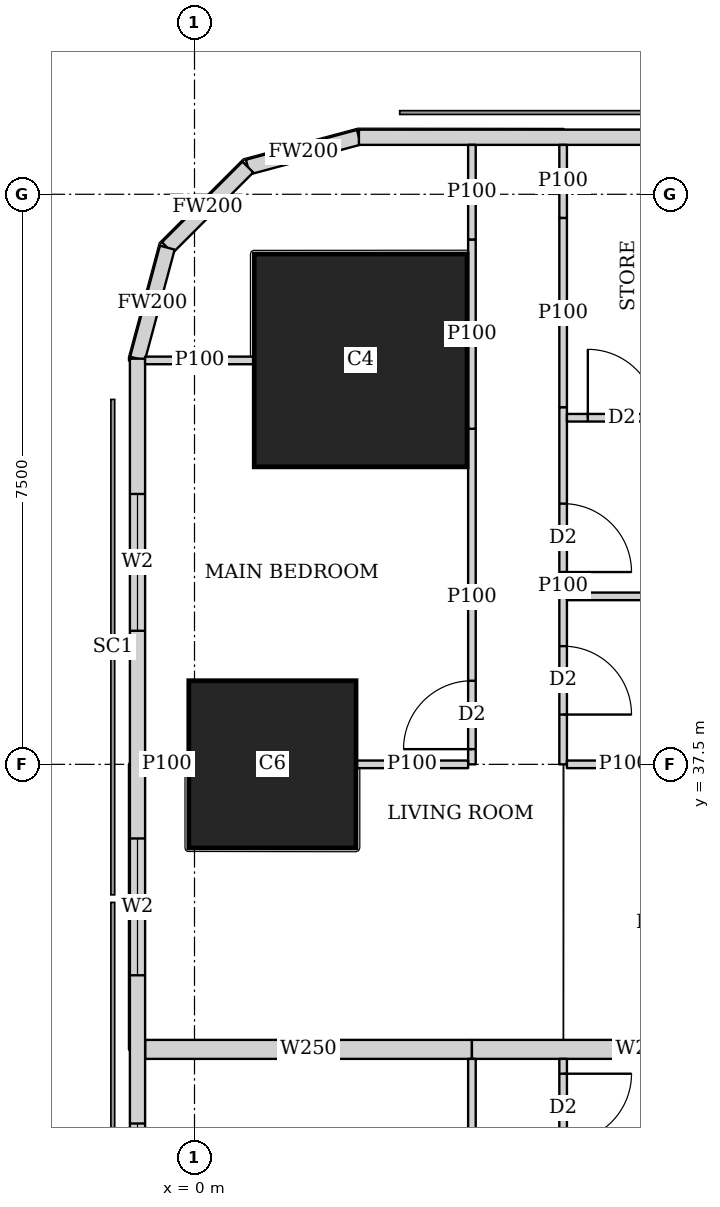
"""IFC4 building model, lengths in metres.
Left out: names, types, materials, properties, quantities, classifications, styles, units other than length and angle.
Written with IfcOpenShell. Run it as: python <this file> out.ifc"""

import sys

from ifc_helpers import new_model, si_unit, direction, frame, frame_2d, origin, origin_2d, place, context, subcontext, project, spatial, rectangle, extrude, element, fill, save


model = new_model("IFC4")
c1 = context("Model", 3, precision=1e-05, world=origin(), true_north=direction((0.0, 1.0)))
c2 = subcontext(c1, "Body", "Model", "MODEL_VIEW")
j1 = project(units=[si_unit("LENGTHUNIT", "METRE"), si_unit("PLANEANGLEUNIT", "RADIAN")], contexts=[c1])
p1 = place(None, origin())
s1 = spatial("IfcSite", under=j1, at=p1, CompositionType="ELEMENT")
p2 = place(p1, origin())
s2 = spatial("IfcBuilding", under=s1, at=p2, CompositionType="ELEMENT")
p3 = place(p2, frame((0.0, 0.0, 100.4)))
s3 = spatial("IfcBuildingStorey", under=s2, at=p3, CompositionType="ELEMENT", Elevation=100.4)
p4 = place(p3, frame((1.025, 37.5, 0.0), z_axis=(0.0, 0.0, 1.0), x_axis=(1.0, 0.0, 0.0)))
e1 = element("IfcColumn", 1, at=p4, inside=s3, PredefinedType="COLUMN", context=c2, shape_type="SweptSolid", body=[
    extrude(rectangle(XDim=2.2, YDim=2.2, at=origin_2d()), origin(), (0.0, 0.0, 1.0), 3.75),
])
p5 = place(p3, frame((2.186, 42.814, 0.0), z_axis=(0.0, 0.0, 1.0), x_axis=(1.0, 0.0, 0.0)))
e2 = element("IfcColumn", 2, at=p5, inside=s3, PredefinedType="COLUMN", context=c2, shape_type="SweptSolid", body=[
    extrude(rectangle(XDim=2.8, YDim=2.8, at=origin_2d()), origin(), (0.0, 0.0, 1.0), 3.75),
])
p6 = place(p3, frame((40.106, 45.75, 0.0), z_axis=(0.0, 0.0, 1.0), x_axis=(-1.0, 0.0, 0.0)))
e3 = element("IfcWall", 3, at=p6, inside=s3, PredefinedType="SOLIDWALL", context=c2, shape_type="SweptSolid", body=[
    extrude(rectangle(XDim=37.943, YDim=0.2, at=frame_2d((18.971, 0.0))), origin(), (0.0, 0.0, 1.0), 3.5),
])
p7 = place(p6, frame((8.606, 0.0, 0.9)))
e4 = element("IfcOpeningElement", 4, at=p7, cuts=e3, PredefinedType="OPENING", context=c2, shape_type="SweptSolid", body=[
    extrude(rectangle(XDim=1.8, YDim=1.5, at=frame_2d((0.9, 0.75))), frame((0.0, 0.11, 0.0), z_axis=(0.0, -1.0, 0.0), x_axis=(1.0, 0.0, 0.0)), (0.0, 0.0, 1.0), 0.22),
])
p8 = place(p6, frame((12.206, 0.0, 0.9)))
e5 = element("IfcOpeningElement", 5, at=p8, cuts=e3, PredefinedType="OPENING", context=c2, shape_type="SweptSolid", body=[
    extrude(rectangle(XDim=1.8, YDim=1.5, at=frame_2d((0.9, 0.75))), frame((0.0, 0.11, 0.0), z_axis=(0.0, -1.0, 0.0), x_axis=(1.0, 0.0, 0.0)), (0.0, 0.0, 1.0), 0.22),
])
p9 = place(p6, frame((15.806, 0.0, 0.9)))
e6 = element("IfcOpeningElement", 6, at=p9, cuts=e3, PredefinedType="OPENING", context=c2, shape_type="SweptSolid", body=[
    extrude(rectangle(XDim=1.8, YDim=1.5, at=frame_2d((0.9, 0.75))), frame((0.0, 0.11, 0.0), z_axis=(0.0, -1.0, 0.0), x_axis=(1.0, 0.0, 0.0)), (0.0, 0.0, 1.0), 0.22),
])
p10 = place(p6, frame((19.406, 0.0, 0.9)))
e7 = element("IfcOpeningElement", 7, at=p10, cuts=e3, PredefinedType="OPENING", context=c2, shape_type="SweptSolid", body=[
    extrude(rectangle(XDim=1.8, YDim=1.5, at=frame_2d((0.9, 0.75))), frame((0.0, 0.11, 0.0), z_axis=(0.0, -1.0, 0.0), x_axis=(1.0, 0.0, 0.0)), (0.0, 0.0, 1.0), 0.22),
])
p11 = place(p6, frame((23.006, 0.0, 0.9)))
e8 = element("IfcOpeningElement", 8, at=p11, cuts=e3, PredefinedType="OPENING", context=c2, shape_type="SweptSolid", body=[
    extrude(rectangle(XDim=1.8, YDim=1.5, at=frame_2d((0.9, 0.75))), frame((0.0, 0.11, 0.0), z_axis=(0.0, -1.0, 0.0), x_axis=(1.0, 0.0, 0.0)), (0.0, 0.0, 1.0), 0.22),
])
p12 = place(p6, frame((26.606, 0.0, 0.9)))
e9 = element("IfcOpeningElement", 9, at=p12, cuts=e3, PredefinedType="OPENING", context=c2, shape_type="SweptSolid", body=[
    extrude(rectangle(XDim=1.8, YDim=1.5, at=frame_2d((0.9, 0.75))), frame((0.0, 0.11, 0.0), z_axis=(0.0, -1.0, 0.0), x_axis=(1.0, 0.0, 0.0)), (0.0, 0.0, 1.0), 0.22),
])
p13 = place(p3, frame((2.163, 45.75, 0.0), z_axis=(0.0, 0.0, 1.0), x_axis=(-0.965832000415, -0.259168954497, 0.0)))
e10 = element("IfcWall", 10, at=p13, inside=s3, PredefinedType="SOLIDWALL", context=c2, shape_type="SweptSolid", body=[
    extrude(rectangle(XDim=1.513, YDim=0.2, at=frame_2d((0.756, 0.0))), origin(), (0.0, 0.0, 1.0), 3.5),
])
p14 = place(p3, frame((0.702, 45.358, 0.0), z_axis=(0.0, 0.0, 1.0), x_axis=(-0.707106781187, -0.707106781187, 0.0)))
e11 = element("IfcWall", 11, at=p14, inside=s3, PredefinedType="SOLIDWALL", context=c2, shape_type="SweptSolid", body=[
    extrude(rectangle(XDim=1.499, YDim=0.2, at=frame_2d((0.75, 0.0))), origin(), (0.0, 0.0, 1.0), 3.5),
])
p15 = place(p3, frame((-0.358, 44.298, 0.0), z_axis=(0.0, 0.0, 1.0), x_axis=(-0.259168954497, -0.965832000415, 0.0)))
e12 = element("IfcWall", 12, at=p15, inside=s3, PredefinedType="SOLIDWALL", context=c2, shape_type="SweptSolid", body=[
    extrude(rectangle(XDim=1.513, YDim=0.2, at=frame_2d((0.756, 0.0))), origin(), (0.0, 0.0, 1.0), 3.5),
])
p16 = place(p3, frame((-0.75, 42.837, 0.0), z_axis=(0.0, 0.0, 1.0), x_axis=(0.0, -1.0, 0.0)))
e13 = element("IfcWall", 13, at=p16, inside=s3, PredefinedType="SOLIDWALL", context=c2, shape_type="SweptSolid", body=[
    extrude(rectangle(XDim=40.674, YDim=0.2, at=frame_2d((20.337, 0.0))), origin(), (0.0, 0.0, 1.0), 3.5),
])
p17 = place(p16, frame((1.78, 0.0, 0.9)))
e14 = element("IfcOpeningElement", 14, at=p17, cuts=e13, PredefinedType="OPENING", context=c2, shape_type="SweptSolid", body=[
    extrude(rectangle(XDim=1.8, YDim=1.5, at=frame_2d((0.9, 0.75))), frame((0.0, 0.11, 0.0), z_axis=(0.0, -1.0, 0.0), x_axis=(1.0, 0.0, 0.0)), (0.0, 0.0, 1.0), 0.22),
])
p18 = place(p16, frame((6.312, 0.0, 0.9)))
e15 = element("IfcOpeningElement", 15, at=p18, cuts=e13, PredefinedType="OPENING", context=c2, shape_type="SweptSolid", body=[
    extrude(rectangle(XDim=1.8, YDim=1.5, at=frame_2d((0.9, 0.75))), frame((0.0, 0.11, 0.0), z_axis=(0.0, -1.0, 0.0), x_axis=(1.0, 0.0, 0.0)), (0.0, 0.0, 1.0), 0.22),
])
p19 = place(p16, frame((10.062, 0.0, 0.9)))
e16 = element("IfcOpeningElement", 16, at=p19, cuts=e13, PredefinedType="OPENING", context=c2, shape_type="SweptSolid", body=[
    extrude(rectangle(XDim=1.8, YDim=1.5, at=frame_2d((0.9, 0.75))), frame((0.0, 0.11, 0.0), z_axis=(0.0, -1.0, 0.0), x_axis=(1.0, 0.0, 0.0)), (0.0, 0.0, 1.0), 0.22),
])
p20 = place(p16, frame((13.812, 0.0, 0.9)))
e17 = element("IfcOpeningElement", 17, at=p20, cuts=e13, PredefinedType="OPENING", context=c2, shape_type="SweptSolid", body=[
    extrude(rectangle(XDim=1.8, YDim=1.5, at=frame_2d((0.9, 0.75))), frame((0.0, 0.11, 0.0), z_axis=(0.0, -1.0, 0.0), x_axis=(1.0, 0.0, 0.0)), (0.0, 0.0, 1.0), 0.22),
])
p21 = place(p16, frame((17.562, 0.0, 0.9)))
e18 = element("IfcOpeningElement", 18, at=p21, cuts=e13, PredefinedType="OPENING", context=c2, shape_type="SweptSolid", body=[
    extrude(rectangle(XDim=1.8, YDim=1.5, at=frame_2d((0.9, 0.75))), frame((0.0, 0.11, 0.0), z_axis=(0.0, -1.0, 0.0), x_axis=(1.0, 0.0, 0.0)), (0.0, 0.0, 1.0), 0.22),
])
p22 = place(p16, frame((21.312, 0.0, 0.9)))
e19 = element("IfcOpeningElement", 19, at=p22, cuts=e13, PredefinedType="OPENING", context=c2, shape_type="SweptSolid", body=[
    extrude(rectangle(XDim=1.8, YDim=1.5, at=frame_2d((0.9, 0.75))), frame((0.0, 0.11, 0.0), z_axis=(0.0, -1.0, 0.0), x_axis=(1.0, 0.0, 0.0)), (0.0, 0.0, 1.0), 0.22),
])
p23 = place(p16, frame((25.062, 0.0, 0.9)))
e20 = element("IfcOpeningElement", 20, at=p23, cuts=e13, PredefinedType="OPENING", context=c2, shape_type="SweptSolid", body=[
    extrude(rectangle(XDim=1.8, YDim=1.5, at=frame_2d((0.9, 0.75))), frame((0.0, 0.11, 0.0), z_axis=(0.0, -1.0, 0.0), x_axis=(1.0, 0.0, 0.0)), (0.0, 0.0, 1.0), 0.22),
])
p24 = place(p16, frame((28.812, 0.0, 0.9)))
e21 = element("IfcOpeningElement", 21, at=p24, cuts=e13, PredefinedType="OPENING", context=c2, shape_type="SweptSolid", body=[
    extrude(rectangle(XDim=1.8, YDim=1.5, at=frame_2d((0.9, 0.75))), frame((0.0, 0.11, 0.0), z_axis=(0.0, -1.0, 0.0), x_axis=(1.0, 0.0, 0.0)), (0.0, 0.0, 1.0), 0.22),
])
p25 = place(p16, frame((32.562, 0.0, 0.9)))
e22 = element("IfcOpeningElement", 22, at=p25, cuts=e13, PredefinedType="OPENING", context=c2, shape_type="SweptSolid", body=[
    extrude(rectangle(XDim=1.8, YDim=1.5, at=frame_2d((0.9, 0.75))), frame((0.0, 0.11, 0.0), z_axis=(0.0, -1.0, 0.0), x_axis=(1.0, 0.0, 0.0)), (0.0, 0.0, 1.0), 0.22),
])
p26 = place(p16, frame((37.094, 0.0, 0.9)))
e23 = element("IfcOpeningElement", 23, at=p26, cuts=e13, PredefinedType="OPENING", context=c2, shape_type="SweptSolid", body=[
    extrude(rectangle(XDim=1.8, YDim=1.5, at=frame_2d((0.9, 0.75))), frame((0.0, 0.11, 0.0), z_axis=(0.0, -1.0, 0.0), x_axis=(1.0, 0.0, 0.0)), (0.0, 0.0, 1.0), 0.22),
])
p27 = place(p3, frame((3.65, 30.0, 0.0), z_axis=(0.0, 0.0, 1.0), x_axis=(0.0, 1.0, 0.0)))
e24 = element("IfcWall", 24, at=p27, inside=s3, PredefinedType="PARTITIONING", context=c2, shape_type="SweptSolid", body=[
    extrude(rectangle(XDim=3.625, YDim=0.1, at=frame_2d((1.812, 0.0))), origin(), (0.0, 0.0, 1.0), 3.5),
])
p28 = place(p27, frame((0.2, 0.0, 0.0)))
e25 = element("IfcOpeningElement", 25, at=p28, cuts=e24, PredefinedType="OPENING", context=c2, shape_type="SweptSolid", body=[
    extrude(rectangle(XDim=0.9, YDim=2.1, at=frame_2d((0.45, 1.05))), frame((0.0, 0.06, 0.0), z_axis=(0.0, -1.0, 0.0), x_axis=(1.0, 0.0, 0.0)), (0.0, 0.0, 1.0), 0.12),
])
p29 = place(p3, frame((4.85, 30.0, 0.0), z_axis=(0.0, 0.0, 1.0), x_axis=(0.0, 1.0, 0.0)))
e26 = element("IfcWall", 26, at=p29, inside=s3, PredefinedType="PARTITIONING", context=c2, shape_type="SweptSolid", body=[
    extrude(rectangle(XDim=3.625, YDim=0.1, at=frame_2d((1.812, 0.0))), origin(), (0.0, 0.0, 1.0), 3.5),
])
p30 = place(p29, frame((0.655, 0.0, 0.0)))
e27 = element("IfcOpeningElement", 27, at=p30, cuts=e26, PredefinedType="OPENING", context=c2, shape_type="SweptSolid", body=[
    extrude(rectangle(XDim=0.9, YDim=2.1, at=frame_2d((0.45, 1.05))), frame((0.0, 0.06, 0.0), z_axis=(0.0, -1.0, 0.0), x_axis=(1.0, 0.0, 0.0)), (0.0, 0.0, 1.0), 0.12),
])
p31 = place(p29, frame((2.53, 0.0, 0.0)))
e28 = element("IfcOpeningElement", 28, at=p31, cuts=e26, PredefinedType="OPENING", context=c2, shape_type="SweptSolid", body=[
    extrude(rectangle(XDim=0.9, YDim=2.1, at=frame_2d((0.45, 1.05))), frame((0.0, 0.06, 0.0), z_axis=(0.0, -1.0, 0.0), x_axis=(1.0, 0.0, 0.0)), (0.0, 0.0, 1.0), 0.12),
])
p32 = place(p3, frame((3.65, 37.5, 0.0), z_axis=(0.0, 0.0, 1.0), x_axis=(0.0, 1.0, 0.0)))
e29 = element("IfcWall", 29, at=p32, inside=s3, PredefinedType="PARTITIONING", context=c2, shape_type="SweptSolid", body=[
    extrude(rectangle(XDim=4.415, YDim=0.1, at=frame_2d((2.208, 0.0))), origin(), (0.0, 0.0, 1.0), 3.5),
])
p33 = place(p32, frame((0.2, 0.0, 0.0)))
e30 = element("IfcOpeningElement", 30, at=p33, cuts=e29, PredefinedType="OPENING", context=c2, shape_type="SweptSolid", body=[
    extrude(rectangle(XDim=0.9, YDim=2.1, at=frame_2d((0.45, 1.05))), frame((0.0, 0.06, 0.0), z_axis=(0.0, -1.0, 0.0), x_axis=(1.0, 0.0, 0.0)), (0.0, 0.0, 1.0), 0.12),
])
p34 = place(p3, frame((3.65, 41.915, 0.0), z_axis=(0.0, 0.0, 1.0), x_axis=(0.0, 1.0, 0.0)))
e31 = element("IfcWall", 31, at=p34, inside=s3, PredefinedType="PARTITIONING", context=c2, shape_type="SweptSolid", body=[
    extrude(rectangle(XDim=2.49, YDim=0.1, at=frame_2d((1.245, 0.0))), origin(), (0.0, 0.0, 1.0), 2.05),
])
p35 = place(p3, frame((3.65, 44.405, 0.0), z_axis=(0.0, 0.0, 1.0), x_axis=(0.0, 1.0, 0.0)))
e32 = element("IfcWall", 32, at=p35, inside=s3, PredefinedType="PARTITIONING", context=c2, shape_type="SweptSolid", body=[
    extrude(rectangle(XDim=1.245, YDim=0.1, at=frame_2d((0.623, 0.0))), origin(), (0.0, 0.0, 1.0), 3.5),
])
p36 = place(p3, frame((4.85, 37.5, 0.0), z_axis=(0.0, 0.0, 1.0), x_axis=(0.0, 1.0, 0.0)))
e33 = element("IfcWall", 33, at=p36, inside=s3, PredefinedType="PARTITIONING", context=c2, shape_type="SweptSolid", body=[
    extrude(rectangle(XDim=4.699, YDim=0.1, at=frame_2d((2.35, 0.0))), origin(), (0.0, 0.0, 1.0), 3.5),
])
p37 = place(p36, frame((0.655, 0.0, 0.0)))
e34 = element("IfcOpeningElement", 34, at=p37, cuts=e33, PredefinedType="OPENING", context=c2, shape_type="SweptSolid", body=[
    extrude(rectangle(XDim=0.9, YDim=2.1, at=frame_2d((0.45, 1.05))), frame((0.0, 0.06, 0.0), z_axis=(0.0, -1.0, 0.0), x_axis=(1.0, 0.0, 0.0)), (0.0, 0.0, 1.0), 0.12),
])
p38 = place(p36, frame((2.53, 0.0, 0.0)))
e35 = element("IfcOpeningElement", 35, at=p38, cuts=e33, PredefinedType="OPENING", context=c2, shape_type="SweptSolid", body=[
    extrude(rectangle(XDim=0.9, YDim=2.1, at=frame_2d((0.45, 1.05))), frame((0.0, 0.06, 0.0), z_axis=(0.0, -1.0, 0.0), x_axis=(1.0, 0.0, 0.0)), (0.0, 0.0, 1.0), 0.12),
])
p39 = place(p3, frame((4.85, 42.199, 0.0), z_axis=(0.0, 0.0, 1.0), x_axis=(0.0, 1.0, 0.0)))
e36 = element("IfcWall", 36, at=p39, inside=s3, PredefinedType="PARTITIONING", context=c2, shape_type="SweptSolid", body=[
    extrude(rectangle(XDim=2.49, YDim=0.1, at=frame_2d((1.245, 0.0))), origin(), (0.0, 0.0, 1.0), 2.05),
])
p40 = place(p3, frame((4.85, 44.689, 0.0), z_axis=(0.0, 0.0, 1.0), x_axis=(0.0, 1.0, 0.0)))
e37 = element("IfcWall", 37, at=p40, inside=s3, PredefinedType="PARTITIONING", context=c2, shape_type="SweptSolid", body=[
    extrude(rectangle(XDim=0.961, YDim=0.1, at=frame_2d((0.48, 0.0))), origin(), (0.0, 0.0, 1.0), 3.5),
])
p41 = place(p3, frame((-0.65, 37.5, 0.0), z_axis=(0.0, 0.0, 1.0), x_axis=(1.0, 0.0, 0.0)))
e38 = element("IfcWall", 38, at=p41, inside=s3, PredefinedType="PARTITIONING", context=c2, shape_type="SweptSolid", body=[
    extrude(rectangle(XDim=0.574, YDim=0.1, at=frame_2d((0.287, 0.0))), origin(), (0.0, 0.0, 1.0), 2.05),
])
p42 = place(p3, frame((2.126, 37.5, 0.0), z_axis=(0.0, 0.0, 1.0), x_axis=(1.0, 0.0, 0.0)))
e39 = element("IfcWall", 39, at=p42, inside=s3, PredefinedType="PARTITIONING", context=c2, shape_type="SweptSolid", body=[
    extrude(rectangle(XDim=1.474, YDim=0.1, at=frame_2d((0.737, 0.0))), origin(), (0.0, 0.0, 1.0), 2.05),
])
p43 = place(p3, frame((-0.65, 42.814, 0.0), z_axis=(0.0, 0.0, 1.0), x_axis=(1.0, 0.0, 0.0)))
e40 = element("IfcWall", 40, at=p43, inside=s3, PredefinedType="PARTITIONING", context=c2, shape_type="SweptSolid", body=[
    extrude(rectangle(XDim=1.435, YDim=0.1, at=frame_2d((0.717, 0.0))), origin(), (0.0, 0.0, 1.0), 3.5),
])
p44 = place(p3, frame((4.9, 37.5, 0.0), z_axis=(0.0, 0.0, 1.0), x_axis=(1.0, 0.0, 0.0)))
e41 = element("IfcWall", 41, at=p44, inside=s3, PredefinedType="PARTITIONING", context=c2, shape_type="SweptSolid", body=[
    extrude(rectangle(XDim=1.499, YDim=0.1, at=frame_2d((0.75, 0.0))), origin(), (0.0, 0.0, 1.0), 3.5),
])
p45 = place(p3, frame((4.9, 39.71, 0.0), z_axis=(0.0, 0.0, 1.0), x_axis=(1.0, 0.0, 0.0)))
e42 = element("IfcWall", 42, at=p45, inside=s3, PredefinedType="PARTITIONING", context=c2, shape_type="SweptSolid", body=[
    extrude(rectangle(XDim=3.275, YDim=0.1, at=frame_2d((1.638, 0.0))), origin(), (0.0, 0.0, 1.0), 3.5),
])
p46 = place(p3, frame((-0.65, 33.75, 0.0), z_axis=(0.0, 0.0, 1.0), x_axis=(1.0, 0.0, 0.0)))
e43 = element("IfcWall", 43, at=p46, inside=s3, PredefinedType="SOLIDWALL", context=c2, shape_type="SweptSolid", body=[
    extrude(rectangle(XDim=4.3, YDim=0.25, at=frame_2d((2.15, 0.0))), origin(), (0.0, 0.0, 1.0), 2.2),
])
p47 = place(p3, frame((3.65, 33.75, 0.0), z_axis=(0.0, 0.0, 1.0), x_axis=(1.0, 0.0, 0.0)))
e44 = element("IfcWall", 44, at=p47, inside=s3, PredefinedType="SOLIDWALL", context=c2, shape_type="SweptSolid", body=[
    extrude(rectangle(XDim=4.525, YDim=0.25, at=frame_2d((2.263, 0.0))), origin(), (0.0, 0.0, 1.0), 3.5),
])
p48 = place(p3, frame((8.175, 42.06, 0.0), z_axis=(0.0, 0.0, 1.0), x_axis=(-1.0, 0.0, 0.0)))
e45 = element("IfcWall", 45, at=p48, inside=s3, PredefinedType="PARTITIONING", context=c2, shape_type="SweptSolid", body=[
    extrude(rectangle(XDim=3.275, YDim=0.1, at=frame_2d((1.638, 0.0))), origin(), (0.0, 0.0, 1.0), 3.5),
])
p49 = place(p48, frame((2.1, 0.0, 0.0)))
e46 = element("IfcOpeningElement", 46, at=p49, cuts=e45, PredefinedType="OPENING", context=c2, shape_type="SweptSolid", body=[
    extrude(rectangle(XDim=0.9, YDim=2.1, at=frame_2d((0.45, 1.05))), frame((0.0, 0.06, 0.0), z_axis=(0.0, -1.0, 0.0), x_axis=(1.0, 0.0, 0.0)), (0.0, 0.0, 1.0), 0.12),
])
p50 = place(p17, origin())
e47 = element("IfcWindow", 47, at=p50, inside=s3, PartitioningType="SINGLE_PANEL", PredefinedType="WINDOW", context=c2, shape_type="SweptSolid", body=[
    extrude(rectangle(XDim=1.8, YDim=1.5, at=frame_2d((0.9, 0.75))), frame((0.0, 0.03, 0.0), z_axis=(0.0, -1.0, 0.0), x_axis=(1.0, 0.0, 0.0)), (0.0, 0.0, 1.0), 0.06),
])
fill(e14, e47)
p51 = place(p18, origin())
e48 = element("IfcWindow", 48, at=p51, inside=s3, PartitioningType="SINGLE_PANEL", PredefinedType="WINDOW", context=c2, shape_type="SweptSolid", body=[
    extrude(rectangle(XDim=1.8, YDim=1.5, at=frame_2d((0.9, 0.75))), frame((0.0, 0.03, 0.0), z_axis=(0.0, -1.0, 0.0), x_axis=(1.0, 0.0, 0.0)), (0.0, 0.0, 1.0), 0.06),
])
fill(e15, e48)
p52 = place(p19, origin())
e49 = element("IfcWindow", 49, at=p52, inside=s3, PartitioningType="SINGLE_PANEL", PredefinedType="WINDOW", context=c2, shape_type="SweptSolid", body=[
    extrude(rectangle(XDim=1.8, YDim=1.5, at=frame_2d((0.9, 0.75))), frame((0.0, 0.03, 0.0), z_axis=(0.0, -1.0, 0.0), x_axis=(1.0, 0.0, 0.0)), (0.0, 0.0, 1.0), 0.06),
])
fill(e16, e49)
p53 = place(p31, origin())
e50 = element("IfcDoor", 50, at=p53, inside=s3, OperationType="SINGLE_SWING_LEFT", PredefinedType="DOOR", context=c2, shape_type="SweptSolid", body=[
    extrude(rectangle(XDim=0.9, YDim=2.1, at=frame_2d((0.45, 1.05))), frame((0.0, 0.025, 0.0), z_axis=(0.0, -1.0, 0.0), x_axis=(1.0, 0.0, 0.0)), (0.0, 0.0, 1.0), 0.05),
])
fill(e28, e50)
p54 = place(p33, origin())
e51 = element("IfcDoor", 51, at=p54, inside=s3, OperationType="SINGLE_SWING_LEFT", PredefinedType="DOOR", context=c2, shape_type="SweptSolid", body=[
    extrude(rectangle(XDim=0.9, YDim=2.1, at=frame_2d((0.45, 1.05))), frame((0.0, 0.025, 0.0), z_axis=(0.0, -1.0, 0.0), x_axis=(1.0, 0.0, 0.0)), (0.0, 0.0, 1.0), 0.05),
])
fill(e30, e51)
p55 = place(p37, origin())
e52 = element("IfcDoor", 52, at=p55, inside=s3, OperationType="SINGLE_SWING_RIGHT", PredefinedType="DOOR", context=c2, shape_type="SweptSolid", body=[
    extrude(rectangle(XDim=0.9, YDim=2.1, at=frame_2d((0.45, 1.05))), frame((0.0, 0.025, 0.0), z_axis=(0.0, -1.0, 0.0), x_axis=(1.0, 0.0, 0.0)), (0.0, 0.0, 1.0), 0.05),
])
fill(e34, e52)
p56 = place(p38, origin())
e53 = element("IfcDoor", 53, at=p56, inside=s3, OperationType="SINGLE_SWING_RIGHT", PredefinedType="DOOR", context=c2, shape_type="SweptSolid", body=[
    extrude(rectangle(XDim=0.9, YDim=2.1, at=frame_2d((0.45, 1.05))), frame((0.0, 0.025, 0.0), z_axis=(0.0, -1.0, 0.0), x_axis=(1.0, 0.0, 0.0)), (0.0, 0.0, 1.0), 0.05),
])
fill(e35, e53)
p57 = place(p49, origin())
e54 = element("IfcDoor", 54, at=p57, inside=s3, OperationType="SINGLE_SWING_LEFT", PredefinedType="DOOR", context=c2, shape_type="SweptSolid", body=[
    extrude(rectangle(XDim=0.9, YDim=2.1, at=frame_2d((0.45, 1.05))), frame((0.0, 0.025, 0.0), z_axis=(0.0, -1.0, 0.0), x_axis=(1.0, 0.0, 0.0)), (0.0, 0.0, 1.0), 0.05),
])
fill(e46, e54)
save(model, sys.argv[1])
